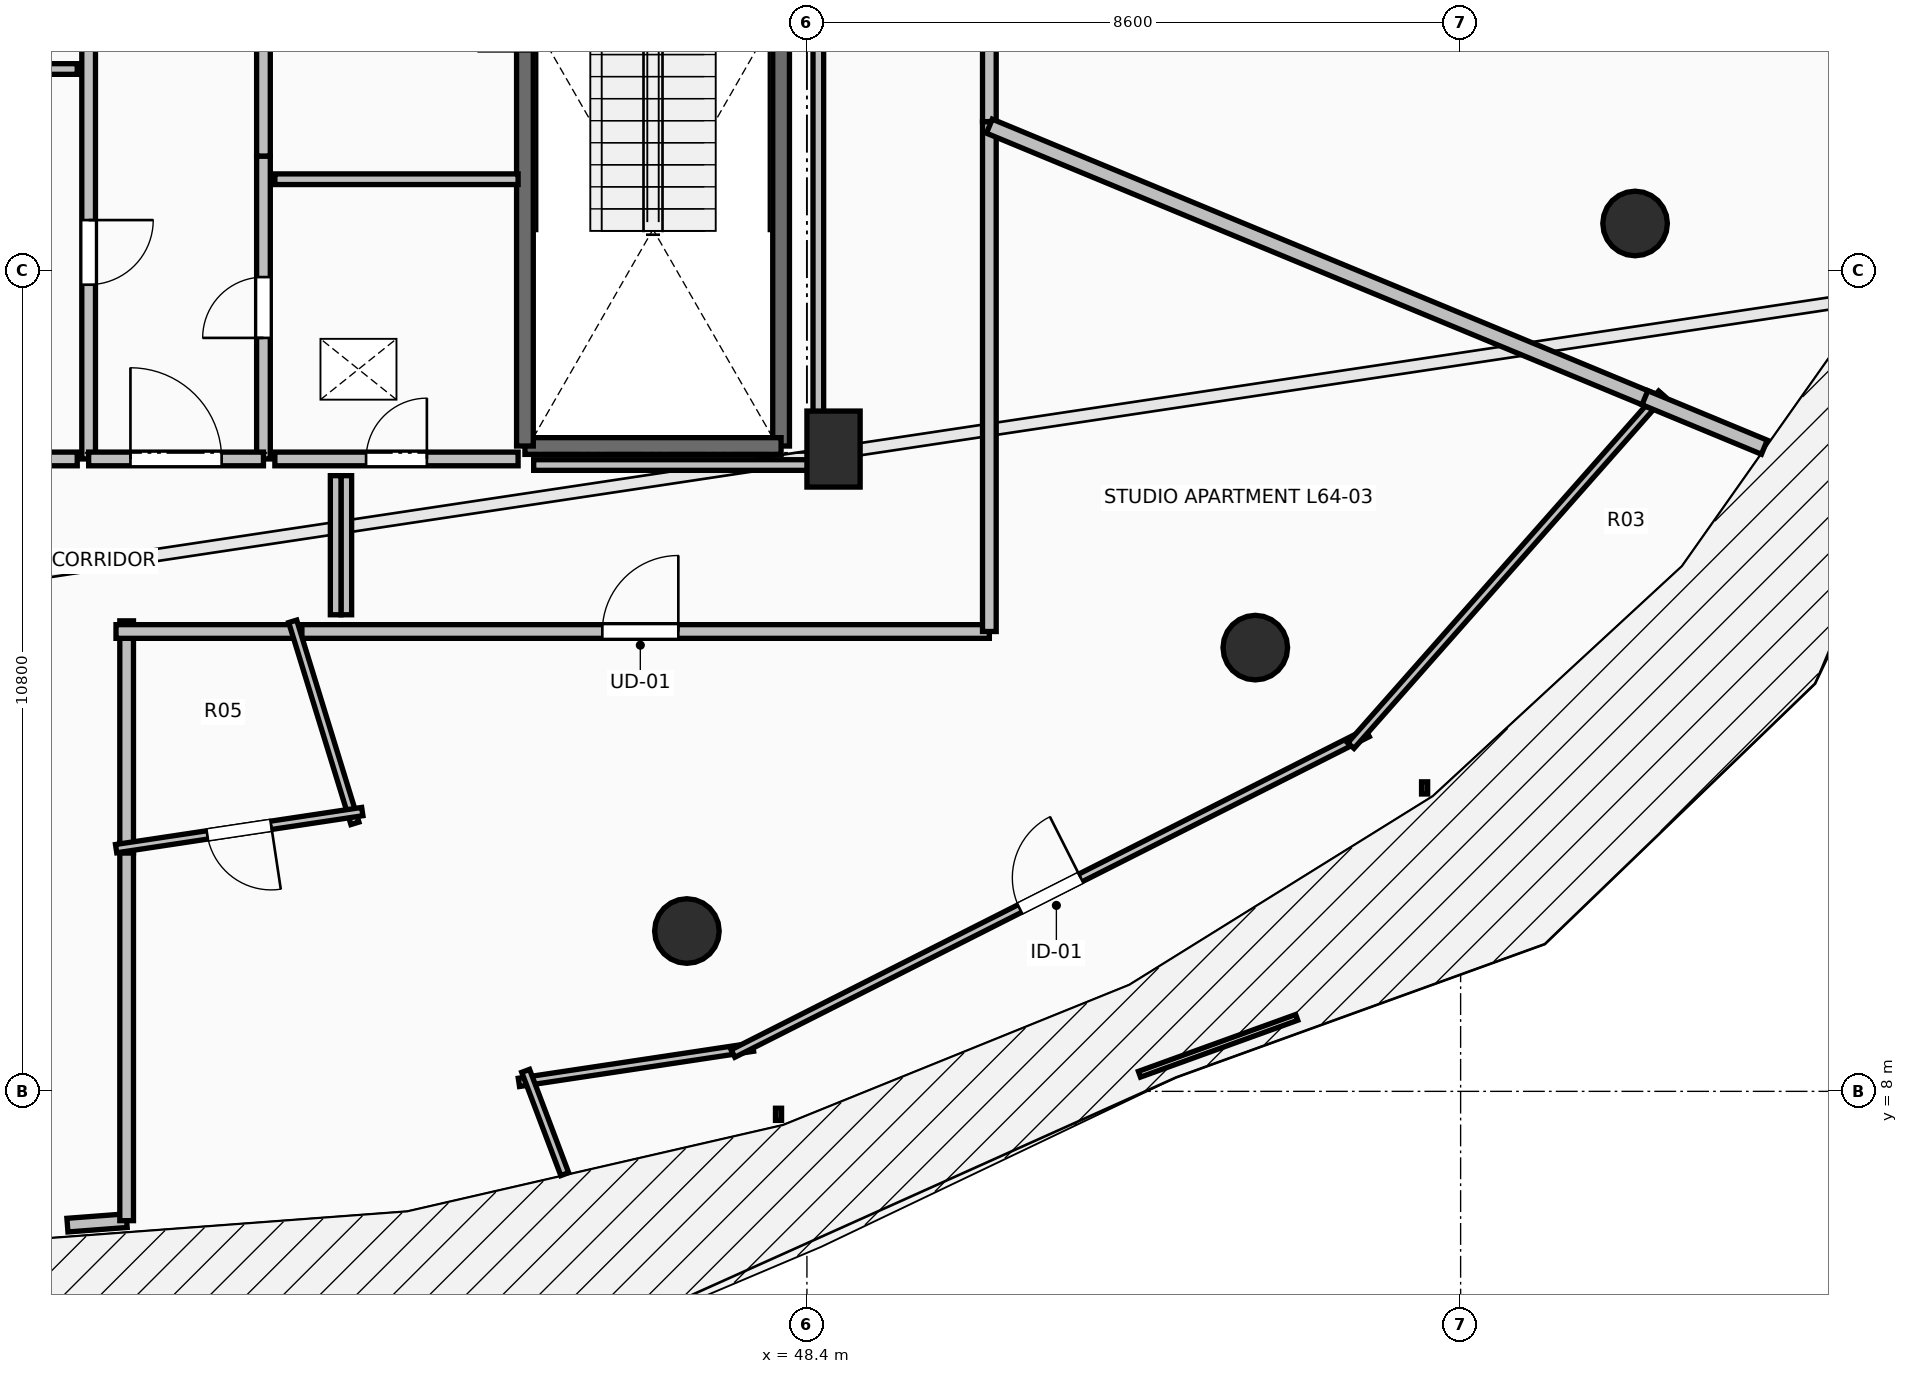
"""IFC4 building model, lengths in metres.
Left out: names, types, materials, properties, quantities, classifications, styles, units other than length and angle.
Written with IfcOpenShell. Run it as: python <this file> out.ifc"""

import sys

from ifc_helpers import new_model, si_unit, direction, frame, frame_2d, origin, origin_2d, place, context, subcontext, project, spatial, rectangle, circle, extrude, element, fill, save


model = new_model("IFC4")
c1 = context("Model", 3, precision=1e-05, world=origin(), true_north=direction((0.0, 1.0)))
c2 = subcontext(c1, "Body", "Model", "MODEL_VIEW")
j1 = project(units=[si_unit("LENGTHUNIT", "METRE"), si_unit("PLANEANGLEUNIT", "RADIAN")], contexts=[c1])
p1 = place(None, origin())
s1 = spatial("IfcSite", under=j1, at=p1, CompositionType="ELEMENT")
p2 = place(p1, origin())
s2 = spatial("IfcBuilding", under=s1, at=p2, CompositionType="ELEMENT")
p3 = place(p2, frame((0.0, 0.0, 237.8)))
s3 = spatial("IfcBuildingStorey", under=s2, at=p3, CompositionType="ELEMENT", Elevation=237.8)
for number, where, z_axis, x_axis in (
    (1, (46.821, 10.109, 0.0), (0.0, 0.0, 1.0), (0.383, -0.924, 0.0)),
    (2, (54.299, 13.838, 0.0), (0.0, 0.0, 1.0), (0.707, -0.707, 0.0)),
    (3, (59.295, 19.418, 0.0), (0.0, 0.0, 1.0), (0.924, -0.383, 0.0)),
):
    element("IfcColumn", number, at=place(p3, frame(where, z_axis=z_axis, x_axis=x_axis)), inside=s3, PredefinedType="COLUMN", context=c2, shape_type="SweptSolid", body=[
        extrude(circle(Radius=0.425, at=origin_2d()), origin(), (0.0, 0.0, 1.0), 3.55),
    ])
p4 = place(p3, frame((48.75, 16.45, 0.0), z_axis=(0.0, 0.0, 1.0), x_axis=(1.0, 0.0, 0.0)))
e4 = element("IfcColumn", 4, at=p4, inside=s3, PredefinedType="PILASTER", context=c2, shape_type="SweptSolid", body=[
    extrude(rectangle(XDim=0.7, YDim=1.0, at=origin_2d()), origin(), (0.0, 0.0, 1.0), 3.55),
])
p5 = place(p3, frame((48.06, 23.91, 0.0), z_axis=(0.0, 0.0, 1.0), x_axis=(0.0, -1.0, 0.0)))
e5 = element("IfcWall", 5, at=p5, inside=s3, PredefinedType="SOLIDWALL", context=c2, shape_type="SweptSolid", body=[
    extrude(rectangle(XDim=7.42, YDim=0.22, at=frame_2d((3.71, 0.0))), origin(), (0.0, 0.0, 1.0), 3.29),
])
p6 = place(p3, frame((48.06, 16.49, 0.0), z_axis=(0.0, 0.0, 1.0), x_axis=(-1.0, 0.0, 0.0)))
e6 = element("IfcWall", 6, at=p6, inside=s3, PredefinedType="SOLIDWALL", context=c2, shape_type="SweptSolid", body=[
    extrude(rectangle(XDim=3.37, YDim=0.22, at=frame_2d((1.685, 0.0))), origin(), (0.0, 0.0, 1.0), 3.29),
])
p7 = place(p3, frame((44.69, 16.49, 0.0), z_axis=(0.0, 0.0, 1.0), x_axis=(0.0, 1.0, 0.0)))
e7 = element("IfcWall", 7, at=p7, inside=s3, PredefinedType="SOLIDWALL", context=c2, shape_type="SweptSolid", body=[
    extrude(rectangle(XDim=7.42, YDim=0.22, at=frame_2d((3.71, 0.0))), origin(), (0.0, 0.0, 1.0), 3.29),
])
p8 = place(p3, frame((41.25, 16.32, 0.0), z_axis=(0.0, 0.0, 1.0), x_axis=(0.0, 1.0, 0.0)))
e8 = element("IfcWall", 8, at=p8, inside=s3, PredefinedType="PARTITIONING", context=c2, shape_type="SweptSolid", body=[
    extrude(rectangle(XDim=3.985, YDim=0.18, at=frame_2d((1.992, 0.0))), origin(), (0.0, 0.0, 1.0), 3.29),
])
p9 = place(p8, frame((1.593, 0.0, 0.0)))
e9 = element("IfcOpeningElement", 9, at=p9, cuts=e8, PredefinedType="OPENING", context=c2, shape_type="SweptSolid", body=[
    extrude(rectangle(XDim=0.8, YDim=2.05, at=frame_2d((0.4, 1.025))), frame((0.0, 0.105, 0.0), z_axis=(0.0, -1.0, 0.0), x_axis=(1.0, 0.0, 0.0)), (0.0, 0.0, 1.0), 0.21),
])
p10 = place(p3, frame((41.25, 20.305, 0.0), z_axis=(0.0, 0.0, 1.0), x_axis=(0.0, 1.0, 0.0)))
e10 = element("IfcWall", 10, at=p10, inside=s3, PredefinedType="PARTITIONING", context=c2, shape_type="SweptSolid", body=[
    extrude(rectangle(XDim=3.895, YDim=0.18, at=frame_2d((1.948, 0.0))), origin(), (0.0, 0.0, 1.0), 2.482),
])
p11 = place(p10, frame((1.522, 0.0, 0.0)))
e11 = element("IfcOpeningElement", 11, at=p11, cuts=e10, PredefinedType="OPENING", context=c2, shape_type="SweptSolid", body=[
    extrude(rectangle(XDim=0.85, YDim=2.1, at=frame_2d((0.425, 1.05))), frame((0.0, 0.105, 0.0), z_axis=(0.0, -1.0, 0.0), x_axis=(1.0, 0.0, 0.0)), (0.0, 0.0, 1.0), 0.21),
])
p12 = place(p3, frame((38.95, 21.755, 0.0), z_axis=(0.0, 0.0, 1.0), x_axis=(0.0, -1.0, 0.0)))
e12 = element("IfcWall", 12, at=p12, inside=s3, PredefinedType="PARTITIONING", context=c2, shape_type="SweptSolid", body=[
    extrude(rectangle(XDim=5.435, YDim=0.18, at=frame_2d((2.717, 0.0))), origin(), (0.0, 0.0, 1.0), 3.29),
])
p13 = place(p12, frame((2.292, 0.0, 0.0)))
e13 = element("IfcOpeningElement", 13, at=p13, cuts=e12, PredefinedType="OPENING", context=c2, shape_type="SweptSolid", body=[
    extrude(rectangle(XDim=0.85, YDim=2.1, at=frame_2d((0.425, 1.05))), frame((0.0, 0.105, 0.0), z_axis=(0.0, -1.0, 0.0), x_axis=(1.0, 0.0, 0.0)), (0.0, 0.0, 1.0), 0.21),
])
p14 = place(p3, frame((38.95, 16.32, 0.0), z_axis=(0.0, 0.0, 1.0), x_axis=(1.0, 0.0, 0.0)))
e14 = element("IfcWall", 14, at=p14, inside=s3, PredefinedType="PARTITIONING", context=c2, shape_type="SweptSolid", body=[
    extrude(rectangle(XDim=2.3, YDim=0.18, at=frame_2d((1.15, 0.0))), origin(), (0.0, 0.0, 1.0), 3.29),
])
p15 = place(p14, frame((0.55, 0.0, 0.0)))
e15 = element("IfcOpeningElement", 15, at=p15, cuts=e14, PredefinedType="OPENING", context=c2, shape_type="SweptSolid", body=[
    extrude(rectangle(XDim=1.2, YDim=2.15, at=frame_2d((0.6, 1.075))), frame((0.0, 0.105, 0.0), z_axis=(0.0, -1.0, 0.0), x_axis=(1.0, 0.0, 0.0)), (0.0, 0.0, 1.0), 0.21),
])
p16 = place(p3, frame((44.6, 20.0, 0.0), z_axis=(0.0, 0.0, 1.0), x_axis=(-1.0, 0.0, 0.0)))
e16 = element("IfcWall", 16, at=p16, inside=s3, PredefinedType="PARTITIONING", context=c2, shape_type="SweptSolid", body=[
    extrude(rectangle(XDim=3.2, YDim=0.14, at=frame_2d((1.6, 0.0))), origin(), (0.0, 0.0, 1.0), 3.29),
])
p17 = place(p3, frame((41.4, 16.32, 0.0), z_axis=(0.0, 0.0, 1.0), x_axis=(1.0, 0.0, 0.0)))
e17 = element("IfcWall", 17, at=p17, inside=s3, PredefinedType="PARTITIONING", context=c2, shape_type="SweptSolid", body=[
    extrude(rectangle(XDim=3.2, YDim=0.18, at=frame_2d((1.6, 0.0))), origin(), (0.0, 0.0, 1.0), 3.29),
])
p18 = place(p17, frame((1.2, 0.0, 0.0)))
e18 = element("IfcOpeningElement", 18, at=p18, cuts=e17, PredefinedType="OPENING", context=c2, shape_type="SweptSolid", body=[
    extrude(rectangle(XDim=0.8, YDim=2.05, at=frame_2d((0.4, 1.025))), frame((0.0, 0.105, 0.0), z_axis=(0.0, -1.0, 0.0), x_axis=(1.0, 0.0, 0.0)), (0.0, 0.0, 1.0), 0.21),
])
p19 = place(p3, frame((38.8, 21.45, 0.0), z_axis=(0.0, 0.0, 1.0), x_axis=(-1.0, 0.0, 0.0)))
e19 = element("IfcWall", 19, at=p19, inside=s3, PredefinedType="PARTITIONING", context=c2, shape_type="SweptSolid", body=[
    extrude(rectangle(XDim=2.955, YDim=0.14, at=frame_2d((1.478, 0.0))), origin(), (0.0, 0.0, 1.0), 3.29),
])
p20 = place(p3, frame((31.4, 16.32, 0.0), z_axis=(0.0, 0.0, 1.0), x_axis=(1.0, 0.0, 0.0)))
e20 = element("IfcWall", 20, at=p20, inside=s3, PredefinedType="PARTITIONING", context=c2, shape_type="SweptSolid", body=[
    extrude(rectangle(XDim=7.4, YDim=0.18, at=frame_2d((3.7, 0.0))), origin(), (0.0, 0.0, 1.0), 3.29),
])
p21 = place(p20, frame((3.275, 0.0, 0.0)))
e21 = element("IfcOpeningElement", 21, at=p21, cuts=e20, PredefinedType="OPENING", context=c2, shape_type="SweptSolid", body=[
    extrude(rectangle(XDim=0.85, YDim=2.1, at=frame_2d((0.425, 1.05))), frame((0.0, 0.105, 0.0), z_axis=(0.0, -1.0, 0.0), x_axis=(1.0, 0.0, 0.0)), (0.0, 0.0, 1.0), 0.21),
])
p22 = place(p3, frame((38.671, 6.24, 0.0), z_axis=(0.0, 0.0, 1.0), x_axis=(0.997136622012, 0.0756211415, 0.0)))
e22 = element("IfcWall", 22, at=p22, inside=s3, PredefinedType="PARTITIONING", context=c2, shape_type="SweptSolid", body=[
    extrude(rectangle(XDim=0.781, YDim=0.18, at=frame_2d((0.391, 0.0))), origin(), (0.0, 0.0, 1.0), 3.29),
])
p23 = place(p3, frame((39.45, 6.299, 0.0), z_axis=(0.0, 0.0, 1.0), x_axis=(0.0, 1.0, 0.0)))
e23 = element("IfcWall", 23, at=p23, inside=s3, PredefinedType="PARTITIONING", context=c2, shape_type="SweptSolid", body=[
    extrude(rectangle(XDim=4.976, YDim=0.18, at=frame_2d((2.488, 0.0))), origin(), (0.0, 0.0, 1.0), 2.482),
])
p24 = place(p3, frame((41.616, 14.05, 0.0), z_axis=(0.0, 0.0, 1.0), x_axis=(1.0, 0.0, 0.0)))
e24 = element("IfcWall", 24, at=p24, inside=s3, PredefinedType="PARTITIONING", context=c2, shape_type="SweptSolid", body=[
    extrude(rectangle(XDim=9.184, YDim=0.18, at=frame_2d((4.592, 0.0))), origin(), (0.0, 0.0, 1.0), 2.482),
])
p25 = place(p24, frame((4.092, 0.0, 0.0)))
e25 = element("IfcOpeningElement", 25, at=p25, cuts=e24, PredefinedType="OPENING", context=c2, shape_type="SweptSolid", body=[
    extrude(rectangle(XDim=1.0, YDim=2.15, at=frame_2d((0.5, 1.075))), frame((0.0, 0.105, 0.0), z_axis=(0.0, -1.0, 0.0), x_axis=(1.0, 0.0, 0.0)), (0.0, 0.0, 1.0), 0.21),
])
p26 = place(p3, frame((50.8, 14.05, 0.0), z_axis=(0.0, 0.0, 1.0), x_axis=(0.0, 1.0, 0.0)))
e26 = element("IfcWall", 26, at=p26, inside=s3, PredefinedType="PARTITIONING", context=c2, shape_type="SweptSolid", body=[
    extrude(rectangle(XDim=6.708, YDim=0.18, at=frame_2d((3.354, 0.0))), origin(), (0.0, 0.0, 1.0), 2.482),
])
p27 = place(p3, frame((39.45, 11.135, 0.0), z_axis=(0.0, 0.0, 1.0), x_axis=(0.0, 1.0, 0.0)))
e27 = element("IfcWall", 27, at=p27, inside=s3, PredefinedType="PARTITIONING", context=c2, shape_type="SweptSolid", body=[
    extrude(rectangle(XDim=3.055, YDim=0.18, at=frame_2d((1.527, 0.0))), origin(), (0.0, 0.0, 1.0), 2.924),
])
p28 = place(p3, frame((39.31, 14.05, 0.0), z_axis=(0.0, 0.0, 1.0), x_axis=(1.0, 0.0, 0.0)))
e28 = element("IfcWall", 28, at=p28, inside=s3, PredefinedType="PARTITIONING", context=c2, shape_type="SweptSolid", body=[
    extrude(rectangle(XDim=2.446, YDim=0.18, at=frame_2d((1.223, 0.0))), origin(), (0.0, 0.0, 1.0), 2.972),
])
p29 = place(p3, frame((50.8, 20.758, 0.0), z_axis=(0.0, 0.0, 1.0), x_axis=(0.0, 1.0, 0.0)))
e29 = element("IfcWall", 29, at=p29, inside=s3, PredefinedType="PARTITIONING", context=c2, shape_type="SweptSolid", body=[
    extrude(rectangle(XDim=15.192, YDim=0.18, at=frame_2d((7.596, 0.0))), origin(), (0.0, 0.0, 1.0), 2.482),
])
p30 = place(p29, frame((7.096, 0.0, 0.0)))
e30 = element("IfcOpeningElement", 30, at=p30, cuts=e29, PredefinedType="OPENING", context=c2, shape_type="SweptSolid", body=[
    extrude(rectangle(XDim=1.0, YDim=2.15, at=frame_2d((0.5, 1.075))), frame((0.0, 0.105, 0.0), z_axis=(0.0, -1.0, 0.0), x_axis=(1.0, 0.0, 0.0)), (0.0, 0.0, 1.0), 0.21),
])
p31 = place(p3, frame((41.635, 14.184, 0.0), z_axis=(0.0, 0.0, 1.0), x_axis=(0.294283258928, -0.955718244837, 0.0)))
e31 = element("IfcWall", 31, at=p31, inside=s3, PredefinedType="PARTITIONING", context=c2, shape_type="SweptSolid", body=[
    extrude(rectangle(XDim=2.781, YDim=0.11, at=frame_2d((1.39, 0.0))), origin(), (0.0, 0.0, 1.0), 2.482),
])
p32 = place(p3, frame((42.55, 11.681, 0.0), z_axis=(0.0, 0.0, 1.0), x_axis=(-0.98884760338, -0.148930914485, 0.0)))
e32 = element("IfcWall", 32, at=p32, inside=s3, PredefinedType="PARTITIONING", context=c2, shape_type="SweptSolid", body=[
    extrude(rectangle(XDim=3.275, YDim=0.11, at=frame_2d((1.638, 0.0))), origin(), (0.0, 0.0, 1.0), 2.482),
])
p33 = place(p32, frame((1.213, 0.0, 0.0)))
e33 = element("IfcOpeningElement", 33, at=p33, cuts=e32, PredefinedType="OPENING", context=c2, shape_type="SweptSolid", body=[
    extrude(rectangle(XDim=0.85, YDim=2.1, at=frame_2d((0.425, 1.05))), frame((0.0, 0.07, 0.0), z_axis=(0.0, -1.0, 0.0), x_axis=(1.0, 0.0, 0.0)), (0.0, 0.0, 1.0), 0.14),
])
p34 = place(p3, frame((44.611, 8.118, 0.0), z_axis=(0.0, 0.0, 1.0), x_axis=(0.988858596585, 0.148857905265, 0.0)))
e34 = element("IfcWall", 34, at=p34, inside=s3, PredefinedType="PARTITIONING", context=c2, shape_type="SweptSolid", body=[
    extrude(rectangle(XDim=3.115, YDim=0.11, at=frame_2d((1.557, 0.0))), origin(), (0.0, 0.0, 1.0), 3.29),
])
p35 = place(p3, frame((47.427, 8.498, 0.0), z_axis=(0.0, 0.0, 1.0), x_axis=(0.892502876412, 0.451041700507, 0.0)))
e35 = element("IfcWall", 35, at=p35, inside=s3, PredefinedType="PARTITIONING", context=c2, shape_type="SweptSolid", body=[
    extrude(rectangle(XDim=9.352, YDim=0.11, at=frame_2d((4.676, 0.0))), origin(), (0.0, 0.0, 1.0), 3.29),
])
p36 = place(p35, frame((4.226, 0.0, 0.0)))
e36 = element("IfcOpeningElement", 36, at=p36, cuts=e35, PredefinedType="OPENING", context=c2, shape_type="SweptSolid", body=[
    extrude(rectangle(XDim=0.9, YDim=2.1, at=frame_2d((0.45, 1.05))), frame((0.0, 0.07, 0.0), z_axis=(0.0, -1.0, 0.0), x_axis=(1.0, 0.0, 0.0)), (0.0, 0.0, 1.0), 0.14),
])
p37 = place(p3, frame((55.556, 12.548, 0.0), z_axis=(0.0, 0.0, 1.0), x_axis=(0.662167862663, 0.749355537549, 0.0)))
e37 = element("IfcWall", 37, at=p37, inside=s3, PredefinedType="PARTITIONING", context=c2, shape_type="SweptSolid", body=[
    extrude(rectangle(XDim=6.177, YDim=0.11, at=frame_2d((3.089, 0.0))), origin(), (0.0, 0.0, 1.0), 3.29),
])
p38 = place(p3, frame((45.213, 6.911, 0.0), z_axis=(0.0, 0.0, 1.0), x_axis=(-0.353737146492, 0.935344872863, 0.0)))
e38 = element("IfcWall", 38, at=p38, inside=s3, PredefinedType="PARTITIONING", context=c2, shape_type="SweptSolid", body=[
    extrude(rectangle(XDim=1.453, YDim=0.11, at=frame_2d((0.727, 0.0))), origin(), (0.0, 0.0, 1.0), 3.29),
])
p39 = place(p3, frame((59.554, 17.072, 0.0), z_axis=(0.0, 0.0, 1.0), x_axis=(-0.923879910499, 0.382682519822, 0.0)))
e39 = element("IfcWall", 39, at=p39, inside=s3, PredefinedType="PARTITIONING", context=c2, shape_type="SweptSolid", body=[
    extrude(rectangle(XDim=9.475, YDim=0.2, at=frame_2d((4.738, 0.0))), origin(), (0.0, 0.0, 1.0), 2.874),
])
p40 = place(p3, frame((60.996, 16.474, 0.0), z_axis=(0.0, 0.0, 1.0), x_axis=(-0.923843638485, 0.382770076719, 0.0)))
e40 = element("IfcWall", 40, at=p40, inside=s3, PredefinedType="PARTITIONING", context=c2, shape_type="SweptSolid", body=[
    extrude(rectangle(XDim=1.701, YDim=0.2, at=frame_2d((0.851, 0.0))), origin(), (0.0, 0.0, 1.0), 3.29),
])
p41 = place(p3, frame((42.34, 14.27, 0.0), z_axis=(0.0, 0.0, 1.0), x_axis=(0.0, 1.0, 0.0)))
e41 = element("IfcWall", 41, at=p41, inside=s3, PredefinedType="PARTITIONING", context=c2, shape_type="SweptSolid", body=[
    extrude(rectangle(XDim=1.83, YDim=0.14, at=frame_2d((0.915, 0.0))), origin(), (0.0, 0.0, 1.0), 3.29),
])
p42 = place(p3, frame((44.805, 16.24, 0.0), z_axis=(0.0, 0.0, 1.0), x_axis=(1.0, 0.0, 0.0)))
e42 = element("IfcWall", 42, at=p42, inside=s3, PredefinedType="PARTITIONING", context=c2, shape_type="SweptSolid", body=[
    extrude(rectangle(XDim=3.745, YDim=0.14, at=frame_2d((1.873, 0.0))), origin(), (0.0, 0.0, 1.0), 2.482),
])
p43 = place(p3, frame((48.55, 16.24, 0.0), z_axis=(0.0, 0.0, 1.0), x_axis=(0.0, 1.0, 0.0)))
e43 = element("IfcWall", 43, at=p43, inside=s3, PredefinedType="PARTITIONING", context=c2, shape_type="SweptSolid", body=[
    extrude(rectangle(XDim=7.514, YDim=0.14, at=frame_2d((3.757, 0.0))), origin(), (0.0, 0.0, 1.0), 2.482),
])
p44 = place(p3, frame((42.2, 16.1, 0.0), z_axis=(0.0, 0.0, 1.0), x_axis=(0.0, -1.0, 0.0)))
e44 = element("IfcWall", 44, at=p44, inside=s3, PredefinedType="PARTITIONING", context=c2, shape_type="SweptSolid", body=[
    extrude(rectangle(XDim=1.83, YDim=0.14, at=frame_2d((0.915, 0.0))), origin(), (0.0, 0.0, 1.0), 3.29),
])
p45 = place(p9, origin())
e45 = element("IfcDoor", 45, at=p45, inside=s3, OperationType="SINGLE_SWING_LEFT", PredefinedType="DOOR", context=c2, shape_type="SweptSolid", body=[
    extrude(rectangle(XDim=0.8, YDim=2.05, at=frame_2d((0.4, 1.025))), frame((0.0, 0.025, 0.0), z_axis=(0.0, -1.0, 0.0), x_axis=(1.0, 0.0, 0.0)), (0.0, 0.0, 1.0), 0.05),
])
fill(e9, e45)
p46 = place(p13, origin())
e46 = element("IfcDoor", 46, at=p46, inside=s3, OperationType="SINGLE_SWING_LEFT", PredefinedType="DOOR", context=c2, shape_type="SweptSolid", body=[
    extrude(rectangle(XDim=0.85, YDim=2.1, at=frame_2d((0.425, 1.05))), frame((0.0, 0.025, 0.0), z_axis=(0.0, -1.0, 0.0), x_axis=(1.0, 0.0, 0.0)), (0.0, 0.0, 1.0), 0.05),
])
fill(e13, e46)
p47 = place(p15, origin())
e47 = element("IfcDoor", 47, at=p47, inside=s3, OperationType="SINGLE_SWING_LEFT", PredefinedType="DOOR", context=c2, shape_type="SweptSolid", body=[
    extrude(rectangle(XDim=1.2, YDim=2.15, at=frame_2d((0.6, 1.075))), frame((0.0, 0.025, 0.0), z_axis=(0.0, -1.0, 0.0), x_axis=(1.0, 0.0, 0.0)), (0.0, 0.0, 1.0), 0.05),
])
fill(e15, e47)
p48 = place(p18, origin())
e48 = element("IfcDoor", 48, at=p48, inside=s3, OperationType="SINGLE_SWING_RIGHT", PredefinedType="DOOR", context=c2, shape_type="SweptSolid", body=[
    extrude(rectangle(XDim=0.8, YDim=2.05, at=frame_2d((0.4, 1.025))), frame((0.0, 0.025, 0.0), z_axis=(0.0, -1.0, 0.0), x_axis=(1.0, 0.0, 0.0)), (0.0, 0.0, 1.0), 0.05),
])
fill(e18, e48)
p49 = place(p25, origin())
e49 = element("IfcDoor", 49, at=p49, inside=s3, OperationType="SINGLE_SWING_RIGHT", PredefinedType="DOOR", context=c2, shape_type="SweptSolid", body=[
    extrude(rectangle(XDim=1.0, YDim=2.15, at=frame_2d((0.5, 1.075))), frame((0.0, 0.025, 0.0), z_axis=(0.0, -1.0, 0.0), x_axis=(1.0, 0.0, 0.0)), (0.0, 0.0, 1.0), 0.05),
])
fill(e25, e49)
p50 = place(p33, origin())
e50 = element("IfcDoor", 50, at=p50, inside=s3, OperationType="SINGLE_SWING_LEFT", PredefinedType="DOOR", context=c2, shape_type="SweptSolid", body=[
    extrude(rectangle(XDim=0.85, YDim=2.1, at=frame_2d((0.425, 1.05))), frame((0.0, 0.025, 0.0), z_axis=(0.0, -1.0, 0.0), x_axis=(1.0, 0.0, 0.0)), (0.0, 0.0, 1.0), 0.05),
])
fill(e33, e50)
p51 = place(p36, origin())
e51 = element("IfcDoor", 51, at=p51, inside=s3, OperationType="SINGLE_SWING_RIGHT", PredefinedType="DOOR", context=c2, shape_type="SweptSolid", body=[
    extrude(rectangle(XDim=0.9, YDim=2.1, at=frame_2d((0.45, 1.05))), frame((0.0, 0.025, 0.0), z_axis=(0.0, -1.0, 0.0), x_axis=(1.0, 0.0, 0.0)), (0.0, 0.0, 1.0), 0.05),
])
fill(e36, e51)
save(model, sys.argv[1])
